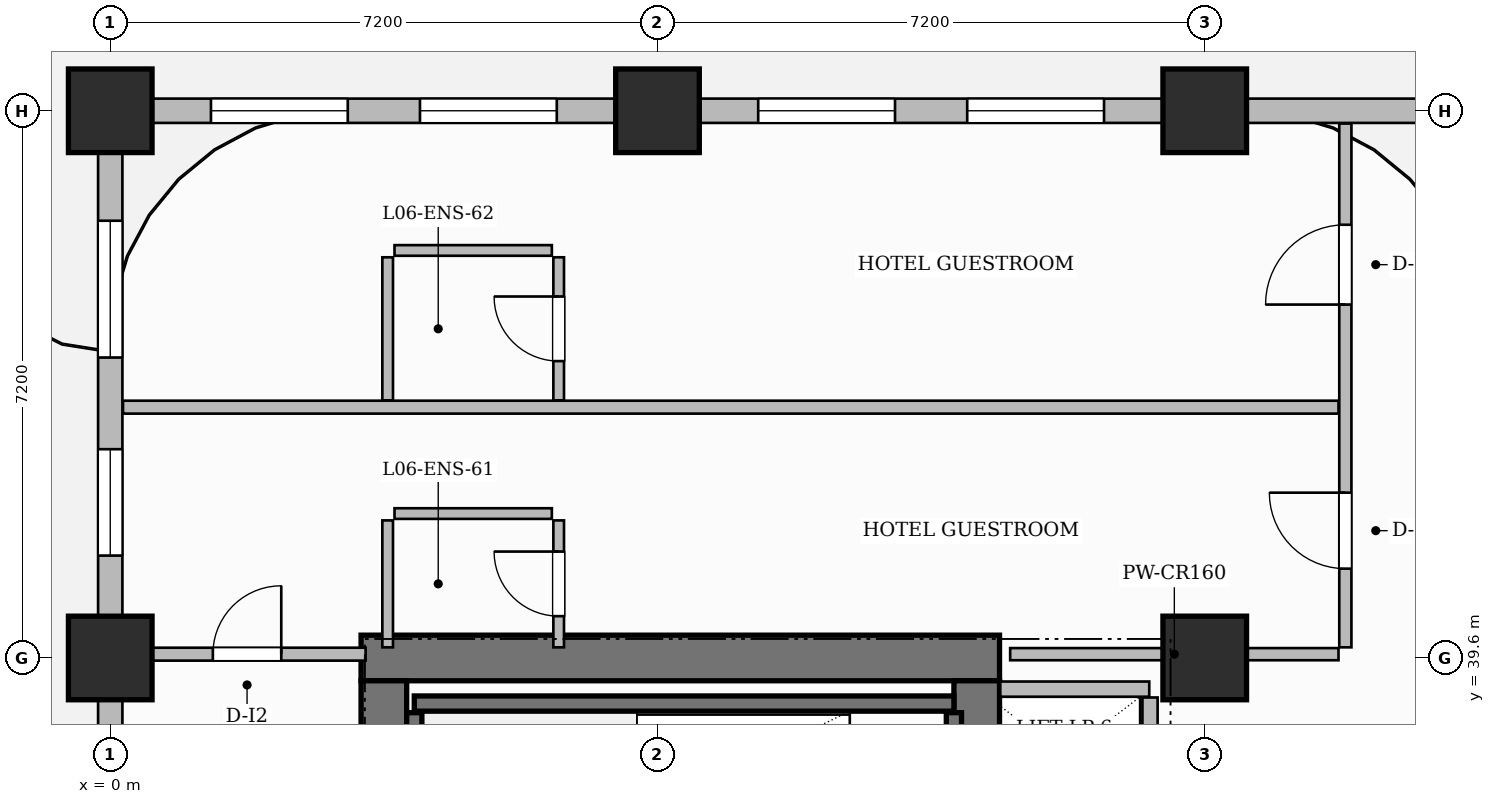
"""IFC4 building model, lengths in metres.
Left out: names, types, materials, properties, quantities, classifications, styles, units other than length and angle.
Written with IfcOpenShell. Run it as: python <this file> out.ifc"""

import sys

from ifc_helpers import new_model, si_unit, direction, frame, frame_2d, origin, origin_2d, place, context, subcontext, project, spatial, rectangle, extrude, source, transform, mapped, element, fill, save


model = new_model("IFC4")
c1 = context("Model", 3, precision=1e-05, world=origin(), true_north=direction((0.0, 1.0)))
c2 = subcontext(c1, "Body", "Model", "MODEL_VIEW")
j1 = project(units=[si_unit("LENGTHUNIT", "METRE"), si_unit("PLANEANGLEUNIT", "RADIAN")], contexts=[c1])
p1 = place(None, origin())
s1 = spatial("IfcSite", under=j1, at=p1, CompositionType="ELEMENT")
p2 = place(p1, origin())
s2 = spatial("IfcBuilding", under=s1, at=p2, CompositionType="ELEMENT")
p3 = place(p2, frame((0.0, 0.0, 32.4)))
s3 = spatial("IfcBuildingStorey", under=s2, at=p3, CompositionType="ELEMENT", Elevation=32.4)
p4 = place(p3, frame((3.3, 39.6, 0.0), z_axis=(0.0, 0.0, 1.0), x_axis=(1.0, 0.0, 0.0)))
e1 = element("IfcWall", 1, at=p4, inside=s3, PredefinedType="SHEAR", context=c2, shape_type="SweptSolid", body=[
    extrude(rectangle(XDim=8.4, YDim=0.6, at=frame_2d((4.2, 0.0))), origin(), (0.0, 0.0, 1.0), 3.7),
])
p5 = place(p3, frame((3.6, 25.5, 0.0), z_axis=(0.0, 0.0, 1.0), x_axis=(0.0, 1.0, 0.0)))
e2 = element("IfcWall", 2, at=p5, inside=s3, PredefinedType="SHEAR", context=c2, shape_type="SweptSolid", body=[
    extrude(rectangle(XDim=13.8, YDim=0.6, at=frame_2d((6.9, 0.0))), origin(), (0.0, 0.0, 1.0), 3.7),
])
p6 = place(p3, frame((11.4, 25.5, 0.0), z_axis=(0.0, 0.0, 1.0), x_axis=(0.0, 1.0, 0.0)))
e3 = element("IfcWall", 3, at=p6, inside=s3, PredefinedType="SHEAR", context=c2, shape_type="SweptSolid", body=[
    extrude(rectangle(XDim=13.8, YDim=0.6, at=frame_2d((6.9, 0.0))), origin(), (0.0, 0.0, 1.0), 3.7),
])
p7 = place(p6, frame((6.47, 0.0, 0.0)))
e4 = element("IfcOpeningElement", 4, at=p7, cuts=e3, PredefinedType="OPENING", context=c2, shape_type="SweptSolid", body=[
    extrude(rectangle(XDim=1.5, YDim=2.2, at=frame_2d((0.75, 1.1))), frame((0.0, 0.31, 0.0), z_axis=(0.0, -1.0, 0.0), x_axis=(1.0, 0.0, 0.0)), (0.0, 0.0, 1.0), 0.62),
])
m1 = source(origin(), c2, "Body", "SweptSolid", [
    extrude(rectangle(XDim=1.1, YDim=1.1, at=origin_2d()), origin(), (0.0, 0.0, 1.0), 3.7),
])
for number, where, z_axis, x_axis in (
    (5, (0.0, 39.6, 0.0), (0.0, 0.0, 1.0), (1.0, 0.0, 0.0)),
    (6, (0.0, 46.8, 0.0), (0.0, 0.0, 1.0), (1.0, 0.0, 0.0)),
    (7, (7.2, 46.8, 0.0), (0.0, 0.0, 1.0), (1.0, 0.0, 0.0)),
    (8, (14.4, 39.6, 0.0), (0.0, 0.0, 1.0), (1.0, 0.0, 0.0)),
    (9, (14.4, 46.8, 0.0), (0.0, 0.0, 1.0), (1.0, 0.0, 0.0)),
):
    element("IfcColumn", number, at=place(p3, frame(where, z_axis=z_axis, x_axis=x_axis)), inside=s3, PredefinedType="COLUMN", context=c2, shape_type="MappedRepresentation", body=[
        mapped(m1, transform((0.0, 0.0, 0.0), scale=1.0)),
    ])
p8 = place(p3, frame((4.0, 39.0, 0.0), z_axis=(0.0, 0.0, 1.0), x_axis=(1.0, 0.0, 0.0)))
e10 = element("IfcWall", 10, at=p8, inside=s3, PredefinedType="SHEAR", context=c2, shape_type="SweptSolid", body=[
    extrude(rectangle(XDim=7.1, YDim=0.2, at=frame_2d((3.55, 0.0))), origin(), (0.0, 0.0, 1.0), 3.7),
])
for number, where, z_axis, x_axis in (
    (11, (4.0, 36.18, 0.0), (0.0, 0.0, 1.0), (0.0, 1.0, 0.0)),
    (12, (11.1, 36.18, 0.0), (0.0, 0.0, 1.0), (0.0, 1.0, 0.0)),
):
    element("IfcWall", number, at=place(p3, frame(where, z_axis=z_axis, x_axis=x_axis)), inside=s3, PredefinedType="SHEAR", context=c2, shape_type="SweptSolid", body=[
        extrude(rectangle(XDim=2.7, YDim=0.2, at=frame_2d((1.35, 0.0))), origin(), (0.0, 0.0, 1.0), 3.7),
    ])
p9 = place(p3, frame((11.71, 39.19, 0.0), z_axis=(0.0, 0.0, 1.0), x_axis=(1.0, 0.0, 0.0)))
e13 = element("IfcWall", 13, at=p9, inside=s3, PredefinedType="PARTITIONING", context=c2, shape_type="SweptSolid", body=[
    extrude(rectangle(XDim=1.96, YDim=0.2, at=frame_2d((0.98, 0.0))), origin(), (0.0, 0.0, 1.0), 3.45),
])
p10 = place(p3, frame((13.68, 34.36, 0.0), z_axis=(0.0, 0.0, 1.0), x_axis=(0.0, 1.0, 0.0)))
e14 = element("IfcWall", 14, at=p10, inside=s3, PredefinedType="PARTITIONING", context=c2, shape_type="SweptSolid", body=[
    extrude(rectangle(XDim=4.72, YDim=0.2, at=frame_2d((2.36, 0.0))), origin(), (0.0, 0.0, 1.0), 3.45),
])
p11 = place(p3, frame((16.25, 39.74, 0.0), z_axis=(0.0, 0.0, 1.0), x_axis=(0.0, 1.0, 0.0)))
e15 = element("IfcWall", 15, at=p11, inside=s3, PredefinedType="PARTITIONING", context=c2, shape_type="SweptSolid", body=[
    extrude(rectangle(XDim=6.892, YDim=0.16, at=frame_2d((3.446, 0.0))), origin(), (0.0, 0.0, 1.0), 3.45),
])
p12 = place(p11, frame((1.035, 0.0, 0.0)))
e16 = element("IfcOpeningElement", 16, at=p12, cuts=e15, PredefinedType="OPENING", context=c2, shape_type="SweptSolid", body=[
    extrude(rectangle(XDim=1.0, YDim=2.2, at=frame_2d((0.5, 1.1))), frame((0.0, 0.09, 0.0), z_axis=(0.0, -1.0, 0.0), x_axis=(1.0, 0.0, 0.0)), (0.0, 0.0, 1.0), 0.18),
])
p13 = place(p11, frame((4.51, 0.0, 0.0)))
e17 = element("IfcOpeningElement", 17, at=p13, cuts=e15, PredefinedType="OPENING", context=c2, shape_type="SweptSolid", body=[
    extrude(rectangle(XDim=1.05, YDim=2.25, at=frame_2d((0.525, 1.125))), frame((0.0, 0.09, 0.0), z_axis=(0.0, -1.0, 0.0), x_axis=(1.0, 0.0, 0.0)), (0.0, 0.0, 1.0), 0.18),
])
p14 = place(p3, frame((11.84, 39.65, 0.0), z_axis=(0.0, 0.0, 1.0), x_axis=(1.0, 0.0, 0.0)))
e18 = element("IfcWall", 18, at=p14, inside=s3, PredefinedType="PARTITIONING", context=c2, shape_type="SweptSolid", body=[
    extrude(rectangle(XDim=4.32, YDim=0.16, at=frame_2d((2.16, 0.0))), origin(), (0.0, 0.0, 1.0), 2.885),
])
p15 = place(p3, frame((0.24, 39.65, 0.0), z_axis=(0.0, 0.0, 1.0), x_axis=(1.0, 0.0, 0.0)))
e19 = element("IfcWall", 19, at=p15, inside=s3, PredefinedType="PARTITIONING", context=c2, shape_type="SweptSolid", body=[
    extrude(rectangle(XDim=3.12, YDim=0.17, at=frame_2d((1.56, 0.0))), origin(), (0.0, 0.0, 1.0), 3.45),
])
p16 = place(p15, frame((1.11, 0.0, 0.0)))
e20 = element("IfcOpeningElement", 20, at=p16, cuts=e19, PredefinedType="OPENING", context=c2, shape_type="SweptSolid", body=[
    extrude(rectangle(XDim=0.9, YDim=2.15, at=frame_2d((0.45, 1.075))), frame((0.0, 0.095, 0.0), z_axis=(0.0, -1.0, 0.0), x_axis=(1.0, 0.0, 0.0)), (0.0, 0.0, 1.0), 0.19),
])
p17 = place(p3, frame((0.168, 42.9, 0.0), z_axis=(0.0, 0.0, 1.0), x_axis=(1.0, 0.0, 0.0)))
e21 = element("IfcWall", 21, at=p17, inside=s3, PredefinedType="PARTITIONING", context=c2, shape_type="SweptSolid", body=[
    extrude(rectangle(XDim=15.992, YDim=0.17, at=frame_2d((7.996, 0.0))), origin(), (0.0, 0.0, 1.0), 3.45),
])
p18 = place(p3, frame((3.65, 39.74, 0.0), z_axis=(0.0, 0.0, 1.0), x_axis=(0.0, 1.0, 0.0)))
e22 = element("IfcWall", 22, at=p18, inside=s3, PredefinedType="PARTITIONING", context=c2, shape_type="SweptSolid", body=[
    extrude(rectangle(XDim=1.67, YDim=0.14, at=frame_2d((0.835, 0.0))), origin(), (0.0, 0.0, 1.0), 3.45),
])
p19 = place(p3, frame((3.74, 41.5, 0.0), z_axis=(0.0, 0.0, 1.0), x_axis=(1.0, 0.0, 0.0)))
e23 = element("IfcWall", 23, at=p19, inside=s3, PredefinedType="PARTITIONING", context=c2, shape_type="SweptSolid", body=[
    extrude(rectangle(XDim=2.07, YDim=0.14, at=frame_2d((1.035, 0.0))), origin(), (0.0, 0.0, 1.0), 2.885),
])
p20 = place(p3, frame((5.9, 39.74, 0.0), z_axis=(0.0, 0.0, 1.0), x_axis=(0.0, 1.0, 0.0)))
e24 = element("IfcWall", 24, at=p20, inside=s3, PredefinedType="PARTITIONING", context=c2, shape_type="SweptSolid", body=[
    extrude(rectangle(XDim=1.67, YDim=0.14, at=frame_2d((0.835, 0.0))), origin(), (0.0, 0.0, 1.0), 3.45),
])
p21 = place(p20, frame((0.41, 0.0, 0.0)))
e25 = element("IfcOpeningElement", 25, at=p21, cuts=e24, PredefinedType="OPENING", context=c2, shape_type="SweptSolid", body=[
    extrude(rectangle(XDim=0.85, YDim=2.1, at=frame_2d((0.425, 1.05))), frame((0.0, 0.08, 0.0), z_axis=(0.0, -1.0, 0.0), x_axis=(1.0, 0.0, 0.0)), (0.0, 0.0, 1.0), 0.16),
])
p22 = place(p3, frame((3.65, 42.99, 0.0), z_axis=(0.0, 0.0, 1.0), x_axis=(0.0, 1.0, 0.0)))
e26 = element("IfcWall", 26, at=p22, inside=s3, PredefinedType="PARTITIONING", context=c2, shape_type="SweptSolid", body=[
    extrude(rectangle(XDim=1.882, YDim=0.14, at=frame_2d((0.941, 0.0))), origin(), (0.0, 0.0, 1.0), 3.45),
])
p23 = place(p3, frame((3.74, 44.962, 0.0), z_axis=(0.0, 0.0, 1.0), x_axis=(1.0, 0.0, 0.0)))
e27 = element("IfcWall", 27, at=p23, inside=s3, PredefinedType="PARTITIONING", context=c2, shape_type="SweptSolid", body=[
    extrude(rectangle(XDim=2.07, YDim=0.14, at=frame_2d((1.035, 0.0))), origin(), (0.0, 0.0, 1.0), 3.45),
])
p24 = place(p3, frame((5.9, 42.99, 0.0), z_axis=(0.0, 0.0, 1.0), x_axis=(0.0, 1.0, 0.0)))
e28 = element("IfcWall", 28, at=p24, inside=s3, PredefinedType="PARTITIONING", context=c2, shape_type="SweptSolid", body=[
    extrude(rectangle(XDim=1.882, YDim=0.14, at=frame_2d((0.941, 0.0))), origin(), (0.0, 0.0, 1.0), 3.45),
])
p25 = place(p24, frame((0.516, 0.0, 0.0)))
e29 = element("IfcOpeningElement", 29, at=p25, cuts=e28, PredefinedType="OPENING", context=c2, shape_type="SweptSolid", body=[
    extrude(rectangle(XDim=0.85, YDim=2.1, at=frame_2d((0.425, 1.05))), frame((0.0, 0.08, 0.0), z_axis=(0.0, -1.0, 0.0), x_axis=(1.0, 0.0, 0.0)), (0.0, 0.0, 1.0), 0.16),
])
p26 = place(p3, frame((0.0, 46.8, 0.0), z_axis=(0.0, 0.0, 1.0), x_axis=(1.0, 0.0, 0.0)))
e30 = element("IfcWall", 30, at=p26, inside=s3, PredefinedType="SOLIDWALL", context=c2, shape_type="SweptSolid", body=[
    extrude(rectangle(XDim=18.0, YDim=0.32, at=frame_2d((9.0, 0.0))), origin(), (0.0, 0.0, 1.0), 2.885),
])
p27 = place(p26, frame((1.325, 0.0, 0.8)))
e31 = element("IfcOpeningElement", 31, at=p27, cuts=e30, PredefinedType="OPENING", context=c2, shape_type="SweptSolid", body=[
    extrude(rectangle(XDim=1.8, YDim=1.85, at=frame_2d((0.9, 0.925))), frame((0.0, 0.17, 0.0), z_axis=(0.0, -1.0, 0.0), x_axis=(1.0, 0.0, 0.0)), (0.0, 0.0, 1.0), 0.34),
])
p28 = place(p26, frame((4.075, 0.0, 0.8)))
e32 = element("IfcOpeningElement", 32, at=p28, cuts=e30, PredefinedType="OPENING", context=c2, shape_type="SweptSolid", body=[
    extrude(rectangle(XDim=1.8, YDim=1.85, at=frame_2d((0.9, 0.925))), frame((0.0, 0.17, 0.0), z_axis=(0.0, -1.0, 0.0), x_axis=(1.0, 0.0, 0.0)), (0.0, 0.0, 1.0), 0.34),
])
p29 = place(p26, frame((8.525, 0.0, 0.8)))
e33 = element("IfcOpeningElement", 33, at=p29, cuts=e30, PredefinedType="OPENING", context=c2, shape_type="SweptSolid", body=[
    extrude(rectangle(XDim=1.8, YDim=1.85, at=frame_2d((0.9, 0.925))), frame((0.0, 0.17, 0.0), z_axis=(0.0, -1.0, 0.0), x_axis=(1.0, 0.0, 0.0)), (0.0, 0.0, 1.0), 0.34),
])
p30 = place(p26, frame((11.275, 0.0, 0.8)))
e34 = element("IfcOpeningElement", 34, at=p30, cuts=e30, PredefinedType="OPENING", context=c2, shape_type="SweptSolid", body=[
    extrude(rectangle(XDim=1.8, YDim=1.85, at=frame_2d((0.9, 0.925))), frame((0.0, 0.17, 0.0), z_axis=(0.0, -1.0, 0.0), x_axis=(1.0, 0.0, 0.0)), (0.0, 0.0, 1.0), 0.34),
])
p31 = place(p3, frame((0.0, 25.25, 0.0), z_axis=(0.0, 0.0, 1.0), x_axis=(0.0, 1.0, 0.0)))
e35 = element("IfcWall", 35, at=p31, inside=s3, PredefinedType="SOLIDWALL", context=c2, shape_type="SweptSolid", body=[
    extrude(rectangle(XDim=21.5, YDim=0.32, at=frame_2d((10.75, 0.0))), origin(), (0.0, 0.0, 1.0), 2.885),
])
p32 = place(p31, frame((1.275, 0.0, 0.8)))
e36 = element("IfcOpeningElement", 36, at=p32, cuts=e35, PredefinedType="OPENING", context=c2, shape_type="SweptSolid", body=[
    extrude(rectangle(XDim=1.8, YDim=1.85, at=frame_2d((0.9, 0.925))), frame((0.0, 0.17, 0.0), z_axis=(0.0, -1.0, 0.0), x_axis=(1.0, 0.0, 0.0)), (0.0, 0.0, 1.0), 0.34),
])
p33 = place(p31, frame((4.025, 0.0, 0.8)))
e37 = element("IfcOpeningElement", 37, at=p33, cuts=e35, PredefinedType="OPENING", context=c2, shape_type="SweptSolid", body=[
    extrude(rectangle(XDim=1.8, YDim=1.85, at=frame_2d((0.9, 0.925))), frame((0.0, 0.17, 0.0), z_axis=(0.0, -1.0, 0.0), x_axis=(1.0, 0.0, 0.0)), (0.0, 0.0, 1.0), 0.34),
])
p34 = place(p31, frame((8.475, 0.0, 0.8)))
e38 = element("IfcOpeningElement", 38, at=p34, cuts=e35, PredefinedType="OPENING", context=c2, shape_type="SweptSolid", body=[
    extrude(rectangle(XDim=1.8, YDim=1.85, at=frame_2d((0.9, 0.925))), frame((0.0, 0.17, 0.0), z_axis=(0.0, -1.0, 0.0), x_axis=(1.0, 0.0, 0.0)), (0.0, 0.0, 1.0), 0.34),
])
p35 = place(p31, frame((11.225, 0.0, 0.8)))
e39 = element("IfcOpeningElement", 39, at=p35, cuts=e35, PredefinedType="OPENING", context=c2, shape_type="SweptSolid", body=[
    extrude(rectangle(XDim=1.8, YDim=1.85, at=frame_2d((0.9, 0.925))), frame((0.0, 0.17, 0.0), z_axis=(0.0, -1.0, 0.0), x_axis=(1.0, 0.0, 0.0)), (0.0, 0.0, 1.0), 0.34),
])
p36 = place(p31, frame((15.697, 0.0, 0.8)))
e40 = element("IfcOpeningElement", 40, at=p36, cuts=e35, PredefinedType="OPENING", context=c2, shape_type="SweptSolid", body=[
    extrude(rectangle(XDim=1.4, YDim=1.85, at=frame_2d((0.7, 0.925))), frame((0.0, 0.17, 0.0), z_axis=(0.0, -1.0, 0.0), x_axis=(1.0, 0.0, 0.0)), (0.0, 0.0, 1.0), 0.34),
])
p37 = place(p31, frame((18.303, 0.0, 0.8)))
e41 = element("IfcOpeningElement", 41, at=p37, cuts=e35, PredefinedType="OPENING", context=c2, shape_type="SweptSolid", body=[
    extrude(rectangle(XDim=1.8, YDim=1.85, at=frame_2d((0.9, 0.925))), frame((0.0, 0.17, 0.0), z_axis=(0.0, -1.0, 0.0), x_axis=(1.0, 0.0, 0.0)), (0.0, 0.0, 1.0), 0.34),
])
m2 = source(origin(), c2, "Body", "SweptSolid", [
    extrude(rectangle(XDim=0.9, YDim=2.15, at=frame_2d((0.45, 1.075))), frame((0.0, 0.025, 0.0), z_axis=(0.0, -1.0, 0.0), x_axis=(1.0, 0.0, 0.0)), (0.0, 0.0, 1.0), 0.05),
])
p38 = place(p16, origin())
e42 = element("IfcDoor", 42, at=p38, inside=s3, OperationType="SINGLE_SWING_RIGHT", PredefinedType="DOOR", context=c2, shape_type="MappedRepresentation", body=[
    mapped(m2, transform((0.0, 0.0, 0.0), scale=1.0)),
])
fill(e20, e42)
m3 = source(origin(), c2, "Body", "SweptSolid", [
    extrude(rectangle(XDim=0.85, YDim=2.1, at=frame_2d((0.425, 1.05))), frame((0.0, 0.025, 0.0), z_axis=(0.0, -1.0, 0.0), x_axis=(1.0, 0.0, 0.0)), (0.0, 0.0, 1.0), 0.05),
])
p39 = place(p21, origin())
e43 = element("IfcDoor", 43, at=p39, inside=s3, OperationType="SINGLE_SWING_RIGHT", PredefinedType="DOOR", context=c2, shape_type="MappedRepresentation", body=[
    mapped(m3, transform((0.0, 0.0, 0.0), scale=1.0)),
])
fill(e25, e43)
m4 = source(origin(), c2, "Body", "SweptSolid", [
    extrude(rectangle(XDim=1.0, YDim=2.2, at=frame_2d((0.5, 1.1))), frame((0.0, 0.025, 0.0), z_axis=(0.0, -1.0, 0.0), x_axis=(1.0, 0.0, 0.0)), (0.0, 0.0, 1.0), 0.05),
])
p40 = place(p12, origin())
e44 = element("IfcDoor", 44, at=p40, inside=s3, OperationType="SINGLE_SWING_RIGHT", PredefinedType="DOOR", context=c2, shape_type="MappedRepresentation", body=[
    mapped(m4, transform((0.0, 0.0, 0.0), scale=1.0)),
])
fill(e16, e44)
p41 = place(p25, origin())
e45 = element("IfcDoor", 45, at=p41, inside=s3, OperationType="SINGLE_SWING_RIGHT", PredefinedType="DOOR", context=c2, shape_type="MappedRepresentation", body=[
    mapped(m3, transform((0.0, 0.0, 0.0), scale=1.0)),
])
fill(e29, e45)
m5 = source(origin(), c2, "Body", "SweptSolid", [
    extrude(rectangle(XDim=1.05, YDim=2.25, at=frame_2d((0.525, 1.125))), frame((0.0, 0.025, 0.0), z_axis=(0.0, -1.0, 0.0), x_axis=(1.0, 0.0, 0.0)), (0.0, 0.0, 1.0), 0.05),
])
p42 = place(p13, origin())
e46 = element("IfcDoor", 46, at=p42, inside=s3, OperationType="SINGLE_SWING_LEFT", PredefinedType="DOOR", context=c2, shape_type="MappedRepresentation", body=[
    mapped(m5, transform((0.0, 0.0, 0.0), scale=1.0)),
])
fill(e17, e46)
m6 = source(origin(), c2, "Body", "SweptSolid", [
    extrude(rectangle(XDim=1.8, YDim=1.85, at=frame_2d((0.9, 0.925))), frame((0.0, 0.03, 0.0), z_axis=(0.0, -1.0, 0.0), x_axis=(1.0, 0.0, 0.0)), (0.0, 0.0, 1.0), 0.06),
])
p43 = place(p27, origin())
e47 = element("IfcWindow", 47, at=p43, inside=s3, PartitioningType="DOUBLE_PANEL_VERTICAL", PredefinedType="WINDOW", context=c2, shape_type="MappedRepresentation", body=[
    mapped(m6, transform((0.0, 0.0, 0.0), scale=1.0)),
])
fill(e31, e47)
p44 = place(p28, origin())
e48 = element("IfcWindow", 48, at=p44, inside=s3, PartitioningType="DOUBLE_PANEL_VERTICAL", PredefinedType="WINDOW", context=c2, shape_type="MappedRepresentation", body=[
    mapped(m6, transform((0.0, 0.0, 0.0), scale=1.0)),
])
fill(e32, e48)
p45 = place(p29, origin())
e49 = element("IfcWindow", 49, at=p45, inside=s3, PartitioningType="DOUBLE_PANEL_VERTICAL", PredefinedType="WINDOW", context=c2, shape_type="MappedRepresentation", body=[
    mapped(m6, transform((0.0, 0.0, 0.0), scale=1.0)),
])
fill(e33, e49)
p46 = place(p30, origin())
e50 = element("IfcWindow", 50, at=p46, inside=s3, PartitioningType="DOUBLE_PANEL_VERTICAL", PredefinedType="WINDOW", context=c2, shape_type="MappedRepresentation", body=[
    mapped(m6, transform((0.0, 0.0, 0.0), scale=1.0)),
])
fill(e34, e50)
m7 = source(origin(), c2, "Body", "SweptSolid", [
    extrude(rectangle(XDim=1.4, YDim=1.85, at=frame_2d((0.7, 0.925))), frame((0.0, 0.03, 0.0), z_axis=(0.0, -1.0, 0.0), x_axis=(1.0, 0.0, 0.0)), (0.0, 0.0, 1.0), 0.06),
])
p47 = place(p36, origin())
e51 = element("IfcWindow", 51, at=p47, inside=s3, PartitioningType="SINGLE_PANEL", PredefinedType="WINDOW", context=c2, shape_type="MappedRepresentation", body=[
    mapped(m7, transform((0.0, 0.0, 0.0), scale=1.0)),
])
fill(e40, e51)
p48 = place(p37, origin())
e52 = element("IfcWindow", 52, at=p48, inside=s3, PartitioningType="DOUBLE_PANEL_VERTICAL", PredefinedType="WINDOW", context=c2, shape_type="MappedRepresentation", body=[
    mapped(m6, transform((0.0, 0.0, 0.0), scale=1.0)),
])
fill(e41, e52)
save(model, sys.argv[1])
